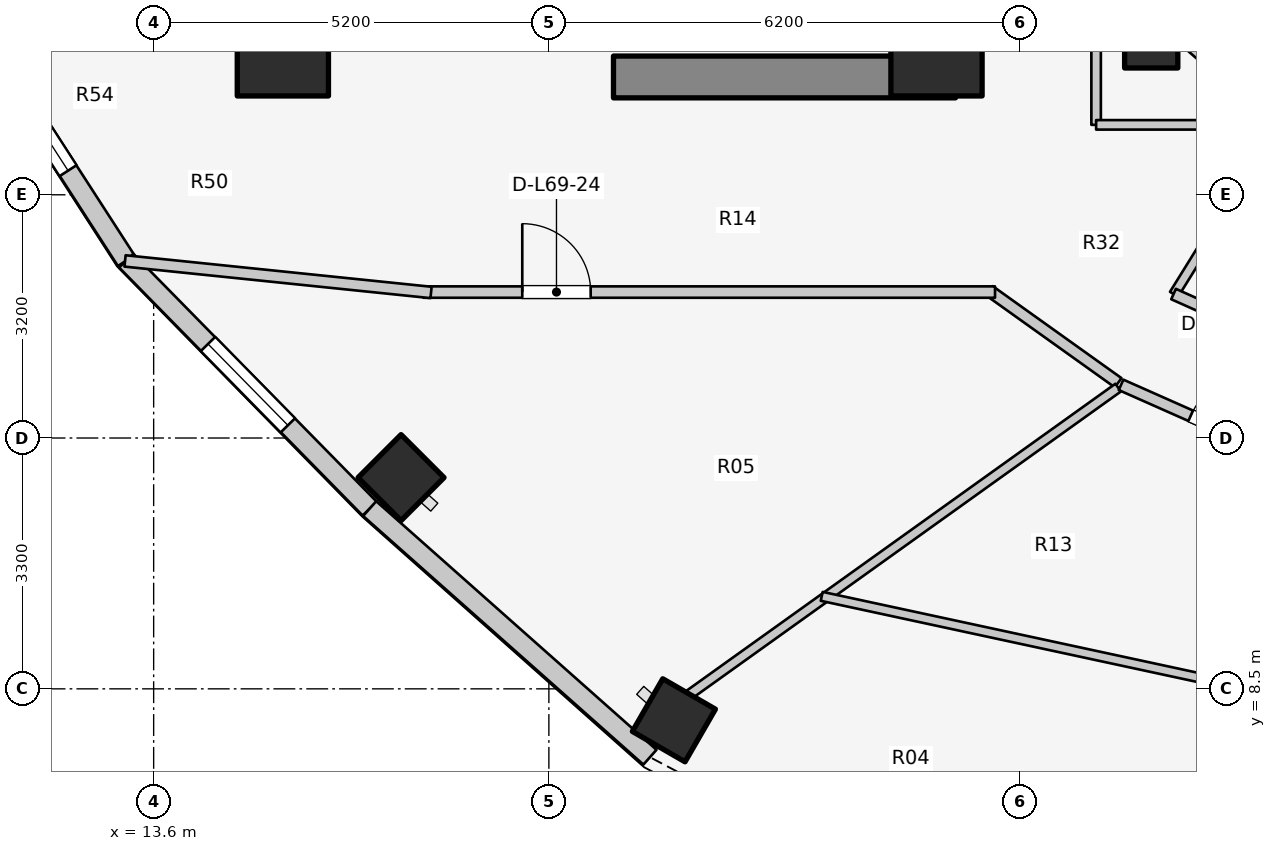
"""IFC4 building model, lengths in metres.
Left out: names, types, materials, properties, quantities, classifications, styles, units other than length and angle.
Written with IfcOpenShell. Run it as: python <this file> out.ifc"""

import sys

from ifc_helpers import new_model, si_unit, direction, frame, frame_2d, origin, origin_2d, place, context, subcontext, project, spatial, rectangle, extrude, element, fill, save


model = new_model("IFC4")
c1 = context("Model", 3, precision=1e-05, world=origin(), true_north=direction((0.0, 1.0)))
c2 = subcontext(c1, "Body", "Model", "MODEL_VIEW")
j1 = project(units=[si_unit("LENGTHUNIT", "METRE"), si_unit("PLANEANGLEUNIT", "RADIAN")], contexts=[c1])
p1 = place(None, origin())
s1 = spatial("IfcSite", under=j1, at=p1, CompositionType="ELEMENT")
p2 = place(p1, origin())
s2 = spatial("IfcBuilding", under=s1, at=p2, CompositionType="ELEMENT")
p3 = place(p2, frame((0.0, 0.0, 226.4)))
s3 = spatial("IfcBuildingStorey", under=s2, at=p3, CompositionType="ELEMENT", Elevation=226.4)
p4 = place(p3, frame((19.65, 16.55, 0.0), z_axis=(0.0, 0.0, 1.0), x_axis=(1.0, 0.0, 0.0)))
e1 = element("IfcWall", 1, at=p4, inside=s3, PredefinedType="SHEAR", context=c2, shape_type="SweptSolid", body=[
    extrude(rectangle(XDim=4.5, YDim=0.55, at=frame_2d((2.25, 0.0))), origin(), (0.0, 0.0, 1.0), 3.1),
])
for number, where, z_axis, x_axis in (
    (2, (15.3, 16.9, 0.0), (0.0, 0.0, 1.0), (1.0, 0.0, 0.0)),
    (3, (23.9, 16.9, 0.0), (0.0, 0.0, 1.0), (1.0, 0.0, 0.0)),
):
    element("IfcColumn", number, at=place(p3, frame(where, z_axis=z_axis, x_axis=x_axis)), inside=s3, PredefinedType="COLUMN", context=c2, shape_type="SweptSolid", body=[
        extrude(rectangle(XDim=1.2, YDim=1.2, at=origin_2d()), origin(), (0.0, 0.0, 1.0), 3.1),
    ])
p5 = place(p3, frame((26.725, 17.018, 0.0), z_axis=(0.0, 0.0, 1.0), x_axis=(1.0, 0.0, 0.0)))
e4 = element("IfcColumn", 4, at=p5, inside=s3, PredefinedType="COLUMN", context=c2, shape_type="SweptSolid", body=[
    extrude(rectangle(XDim=0.7, YDim=0.7, at=origin_2d()), origin(), (0.0, 0.0, 1.0), 3.1),
])
for number, where, z_axis, x_axis in (
    (5, (16.855, 11.279, 0.0), (0.0, 0.0, 1.0), (-0.707, -0.707, 0.0)),
    (6, (20.445, 8.086, 0.0), (0.0, 0.0, 1.0), (-0.5, -0.866, 0.0)),
):
    element("IfcColumn", number, at=place(p3, frame(where, z_axis=z_axis, x_axis=x_axis)), inside=s3, PredefinedType="COLUMN", context=c2, shape_type="SweptSolid", body=[
        extrude(rectangle(XDim=0.8, YDim=0.8, at=origin_2d()), origin(), (0.0, 0.0, 1.0), 3.1),
    ])
p6 = place(p3, frame((26.965, 17.258, 0.0), z_axis=(0.0, 0.0, 1.0), x_axis=(0.752576694707, -0.658504607869, 0.0)))
e7 = element("IfcWall", 7, at=p6, inside=s3, PredefinedType="STANDARD", context=c2, shape_type="SweptSolid", body=[
    extrude(rectangle(XDim=1.959, YDim=0.23, at=frame_2d((0.98, 0.0))), origin(), (0.0, 0.0, 1.0), 2.16),
])
p7 = place(p3, frame((10.895, 17.761, 0.0), z_axis=(0.0, 0.0, 1.0), x_axis=(0.542641766008, -0.839964233634, 0.0)))
e8 = element("IfcWall", 8, at=p7, inside=s3, PredefinedType="STANDARD", context=c2, shape_type="SweptSolid", body=[
    extrude(rectangle(XDim=4.319, YDim=0.26, at=frame_2d((2.16, 0.0))), origin(), (0.0, 0.0, 1.0), 2.85),
])
p8 = place(p7, frame((1.41, 0.0, 0.75)))
e9 = element("IfcOpeningElement", 9, at=p8, cuts=e8, PredefinedType="OPENING", context=c2, shape_type="SweptSolid", body=[
    extrude(rectangle(XDim=1.5, YDim=1.6, at=frame_2d((0.75, 0.8))), frame((0.0, 0.14, 0.0), z_axis=(0.0, -1.0, 0.0), x_axis=(1.0, 0.0, 0.0)), (0.0, 0.0, 1.0), 0.28),
])
p9 = place(p3, frame((13.239, 14.133, 0.0), z_axis=(0.0, 0.0, 1.0), x_axis=(0.700642973333, -0.713512034881, 0.0)))
e10 = element("IfcWall", 10, at=p9, inside=s3, PredefinedType="STANDARD", context=c2, shape_type="SweptSolid", body=[
    extrude(rectangle(XDim=4.572, YDim=0.26, at=frame_2d((2.286, 0.0))), origin(), (0.0, 0.0, 1.0), 2.85),
])
p10 = place(p9, frame((1.536, 0.0, 0.75)))
e11 = element("IfcOpeningElement", 11, at=p10, cuts=e10, PredefinedType="OPENING", context=c2, shape_type="SweptSolid", body=[
    extrude(rectangle(XDim=1.5, YDim=1.6, at=frame_2d((0.75, 0.8))), frame((0.0, 0.14, 0.0), z_axis=(0.0, -1.0, 0.0), x_axis=(1.0, 0.0, 0.0)), (0.0, 0.0, 1.0), 0.28),
])
p11 = place(p3, frame((16.442, 10.871, 0.0), z_axis=(0.0, 0.0, 1.0), x_axis=(0.748165854006, -0.663511759428, 0.0)))
e12 = element("IfcWall", 12, at=p11, inside=s3, PredefinedType="STANDARD", context=c2, shape_type="SweptSolid", body=[
    extrude(rectangle(XDim=4.929, YDim=0.26, at=frame_2d((2.464, 0.0))), origin(), (0.0, 0.0, 1.0), 2.85),
])
p12 = place(p3, frame((28.45, 15.985, 0.0), z_axis=(0.0, 0.0, 1.0), x_axis=(-0.527527080983, -0.849538215049, 0.0)))
e13 = element("IfcWall", 13, at=p12, inside=s3, PredefinedType="PARTITIONING", context=c2, shape_type="SweptSolid", body=[
    extrude(rectangle(XDim=2.701, YDim=0.125, at=frame_2d((1.351, 0.0))), origin(), (0.0, 0.0, 1.0), 2.376),
])
p13 = place(p3, frame((27.019, 13.694, 0.0), z_axis=(0.0, 0.0, 1.0), x_axis=(0.912628408652, -0.408790151203, 0.0)))
e14 = element("IfcWall", 14, at=p13, inside=s3, PredefinedType="PARTITIONING", context=c2, shape_type="SweptSolid", body=[
    extrude(rectangle(XDim=2.638, YDim=0.15, at=frame_2d((1.319, 0.0))), origin(), (0.0, 0.0, 1.0), 2.376),
])
p14 = place(p3, frame((26.0, 15.92, 0.0), z_axis=(0.0, 0.0, 1.0), x_axis=(0.0, 1.0, 0.0)))
e15 = element("IfcWall", 15, at=p14, inside=s3, PredefinedType="PARTITIONING", context=c2, shape_type="SweptSolid", body=[
    extrude(rectangle(XDim=4.28, YDim=0.125, at=frame_2d((2.14, 0.0))), origin(), (0.0, 0.0, 1.0), 2.232),
])
p15 = place(p3, frame((26.0, 15.92, 0.0), z_axis=(0.0, 0.0, 1.0), x_axis=(1.0, 0.0, 0.0)))
e16 = element("IfcWall", 16, at=p15, inside=s3, PredefinedType="PARTITIONING", context=c2, shape_type="SweptSolid", body=[
    extrude(rectangle(XDim=2.6, YDim=0.125, at=frame_2d((1.3, 0.0))), origin(), (0.0, 0.0, 1.0), 2.232),
])
p16 = place(p3, frame((26.29, 12.527, 0.0), z_axis=(0.0, 0.0, 1.0), x_axis=(-0.813780999276, 0.581171648669, 0.0)))
e17 = element("IfcWall", 17, at=p16, inside=s3, PredefinedType="PARTITIONING", context=c2, shape_type="SweptSolid", body=[
    extrude(rectangle(XDim=2.082, YDim=0.15, at=frame_2d((1.041, 0.0))), origin(), (0.0, 0.0, 1.0), 2.376),
])
p17 = place(p3, frame((17.15, 13.72, 0.0), z_axis=(0.0, 0.0, 1.0), x_axis=(1.0, 0.0, 0.0)))
e18 = element("IfcWall", 18, at=p17, inside=s3, PredefinedType="PARTITIONING", context=c2, shape_type="SweptSolid", body=[
    extrude(rectangle(XDim=7.52, YDim=0.15, at=frame_2d((3.76, 0.0))), origin(), (0.0, 0.0, 1.0), 2.376),
])
p18 = place(p17, frame((1.3, 0.0, 0.0)))
e19 = element("IfcOpeningElement", 19, at=p18, cuts=e18, PredefinedType="OPENING", context=c2, shape_type="SweptSolid", body=[
    extrude(rectangle(XDim=0.9, YDim=2.1, at=frame_2d((0.45, 1.05))), frame((0.0, 0.085, 0.0), z_axis=(0.0, -1.0, 0.0), x_axis=(1.0, 0.0, 0.0)), (0.0, 0.0, 1.0), 0.17),
])
p19 = place(p3, frame((17.25, 13.715, 0.0), z_axis=(0.0, 0.0, 1.0), x_axis=(-0.994734711466, 0.102483431859, 0.0)))
e20 = element("IfcWall", 20, at=p19, inside=s3, PredefinedType="PARTITIONING", context=c2, shape_type="SweptSolid", body=[
    extrude(rectangle(XDim=4.047, YDim=0.15, at=frame_2d((2.024, 0.0))), origin(), (0.0, 0.0, 1.0), 2.22),
])
p20 = place(p3, frame((26.29, 12.463, 0.0), z_axis=(0.0, 0.0, 1.0), x_axis=(-0.813163816543, -0.582034885093, 0.0)))
e21 = element("IfcWall", 21, at=p20, inside=s3, PredefinedType="PARTITIONING", context=c2, shape_type="SweptSolid", body=[
    extrude(rectangle(XDim=6.955, YDim=0.125, at=frame_2d((3.477, 0.0))), origin(), (0.0, 0.0, 1.0), 2.376),
])
p21 = place(p3, frame((22.39, 9.717, 0.0), z_axis=(0.0, 0.0, 1.0), x_axis=(0.977534972695, -0.210773283785, 0.0)))
e22 = element("IfcWall", 22, at=p21, inside=s3, PredefinedType="MOVABLE", context=c2, shape_type="SweptSolid", body=[
    extrude(rectangle(XDim=5.453, YDim=0.12, at=frame_2d((2.727, 0.0))), origin(), (0.0, 0.0, 1.0), 2.376),
])
p22 = place(p3, frame((26.328, 12.499, 0.0), z_axis=(0.0, 0.0, 1.0), x_axis=(0.914139569865, -0.405399613724, 0.0)))
e23 = element("IfcWall", 23, at=p22, inside=s3, PredefinedType="PARTITIONING", context=c2, shape_type="SweptSolid", body=[
    extrude(rectangle(XDim=3.005, YDim=0.15, at=frame_2d((1.502, 0.0))), origin(), (0.0, 0.0, 1.0), 2.376),
])
p23 = place(p22, frame((1.002, 0.0, 0.0)))
e24 = element("IfcOpeningElement", 24, at=p23, cuts=e23, PredefinedType="OPENING", context=c2, shape_type="SweptSolid", body=[
    extrude(rectangle(XDim=1.0, YDim=2.1, at=frame_2d((0.5, 1.05))), frame((0.0, 0.085, 0.0), z_axis=(0.0, -1.0, 0.0), x_axis=(1.0, 0.0, 0.0)), (0.0, 0.0, 1.0), 0.17),
])
p24 = place(p8, origin())
e25 = element("IfcWindow", 25, at=p24, inside=s3, PartitioningType="SINGLE_PANEL", PredefinedType="WINDOW", context=c2, shape_type="SweptSolid", body=[
    extrude(rectangle(XDim=1.5, YDim=1.6, at=frame_2d((0.75, 0.8))), frame((0.0, 0.03, 0.0), z_axis=(0.0, -1.0, 0.0), x_axis=(1.0, 0.0, 0.0)), (0.0, 0.0, 1.0), 0.06),
])
fill(e9, e25)
p25 = place(p10, origin())
e26 = element("IfcWindow", 26, at=p25, inside=s3, PartitioningType="SINGLE_PANEL", PredefinedType="WINDOW", context=c2, shape_type="SweptSolid", body=[
    extrude(rectangle(XDim=1.5, YDim=1.6, at=frame_2d((0.75, 0.8))), frame((0.0, 0.03, 0.0), z_axis=(0.0, -1.0, 0.0), x_axis=(1.0, 0.0, 0.0)), (0.0, 0.0, 1.0), 0.06),
])
fill(e11, e26)
p26 = place(p18, origin())
e27 = element("IfcDoor", 27, at=p26, inside=s3, OperationType="SINGLE_SWING_LEFT", PredefinedType="DOOR", context=c2, shape_type="SweptSolid", body=[
    extrude(rectangle(XDim=0.9, YDim=2.1, at=frame_2d((0.45, 1.05))), frame((0.0, 0.025, 0.0), z_axis=(0.0, -1.0, 0.0), x_axis=(1.0, 0.0, 0.0)), (0.0, 0.0, 1.0), 0.05),
])
fill(e19, e27)
p27 = place(p23, origin())
e28 = element("IfcDoor", 28, at=p27, inside=s3, OperationType="SINGLE_SWING_RIGHT", PredefinedType="DOOR", context=c2, shape_type="SweptSolid", body=[
    extrude(rectangle(XDim=1.0, YDim=2.1, at=frame_2d((0.5, 1.05))), frame((0.0, 0.025, 0.0), z_axis=(0.0, -1.0, 0.0), x_axis=(1.0, 0.0, 0.0)), (0.0, 0.0, 1.0), 0.05),
])
fill(e24, e28)
save(model, sys.argv[1])
